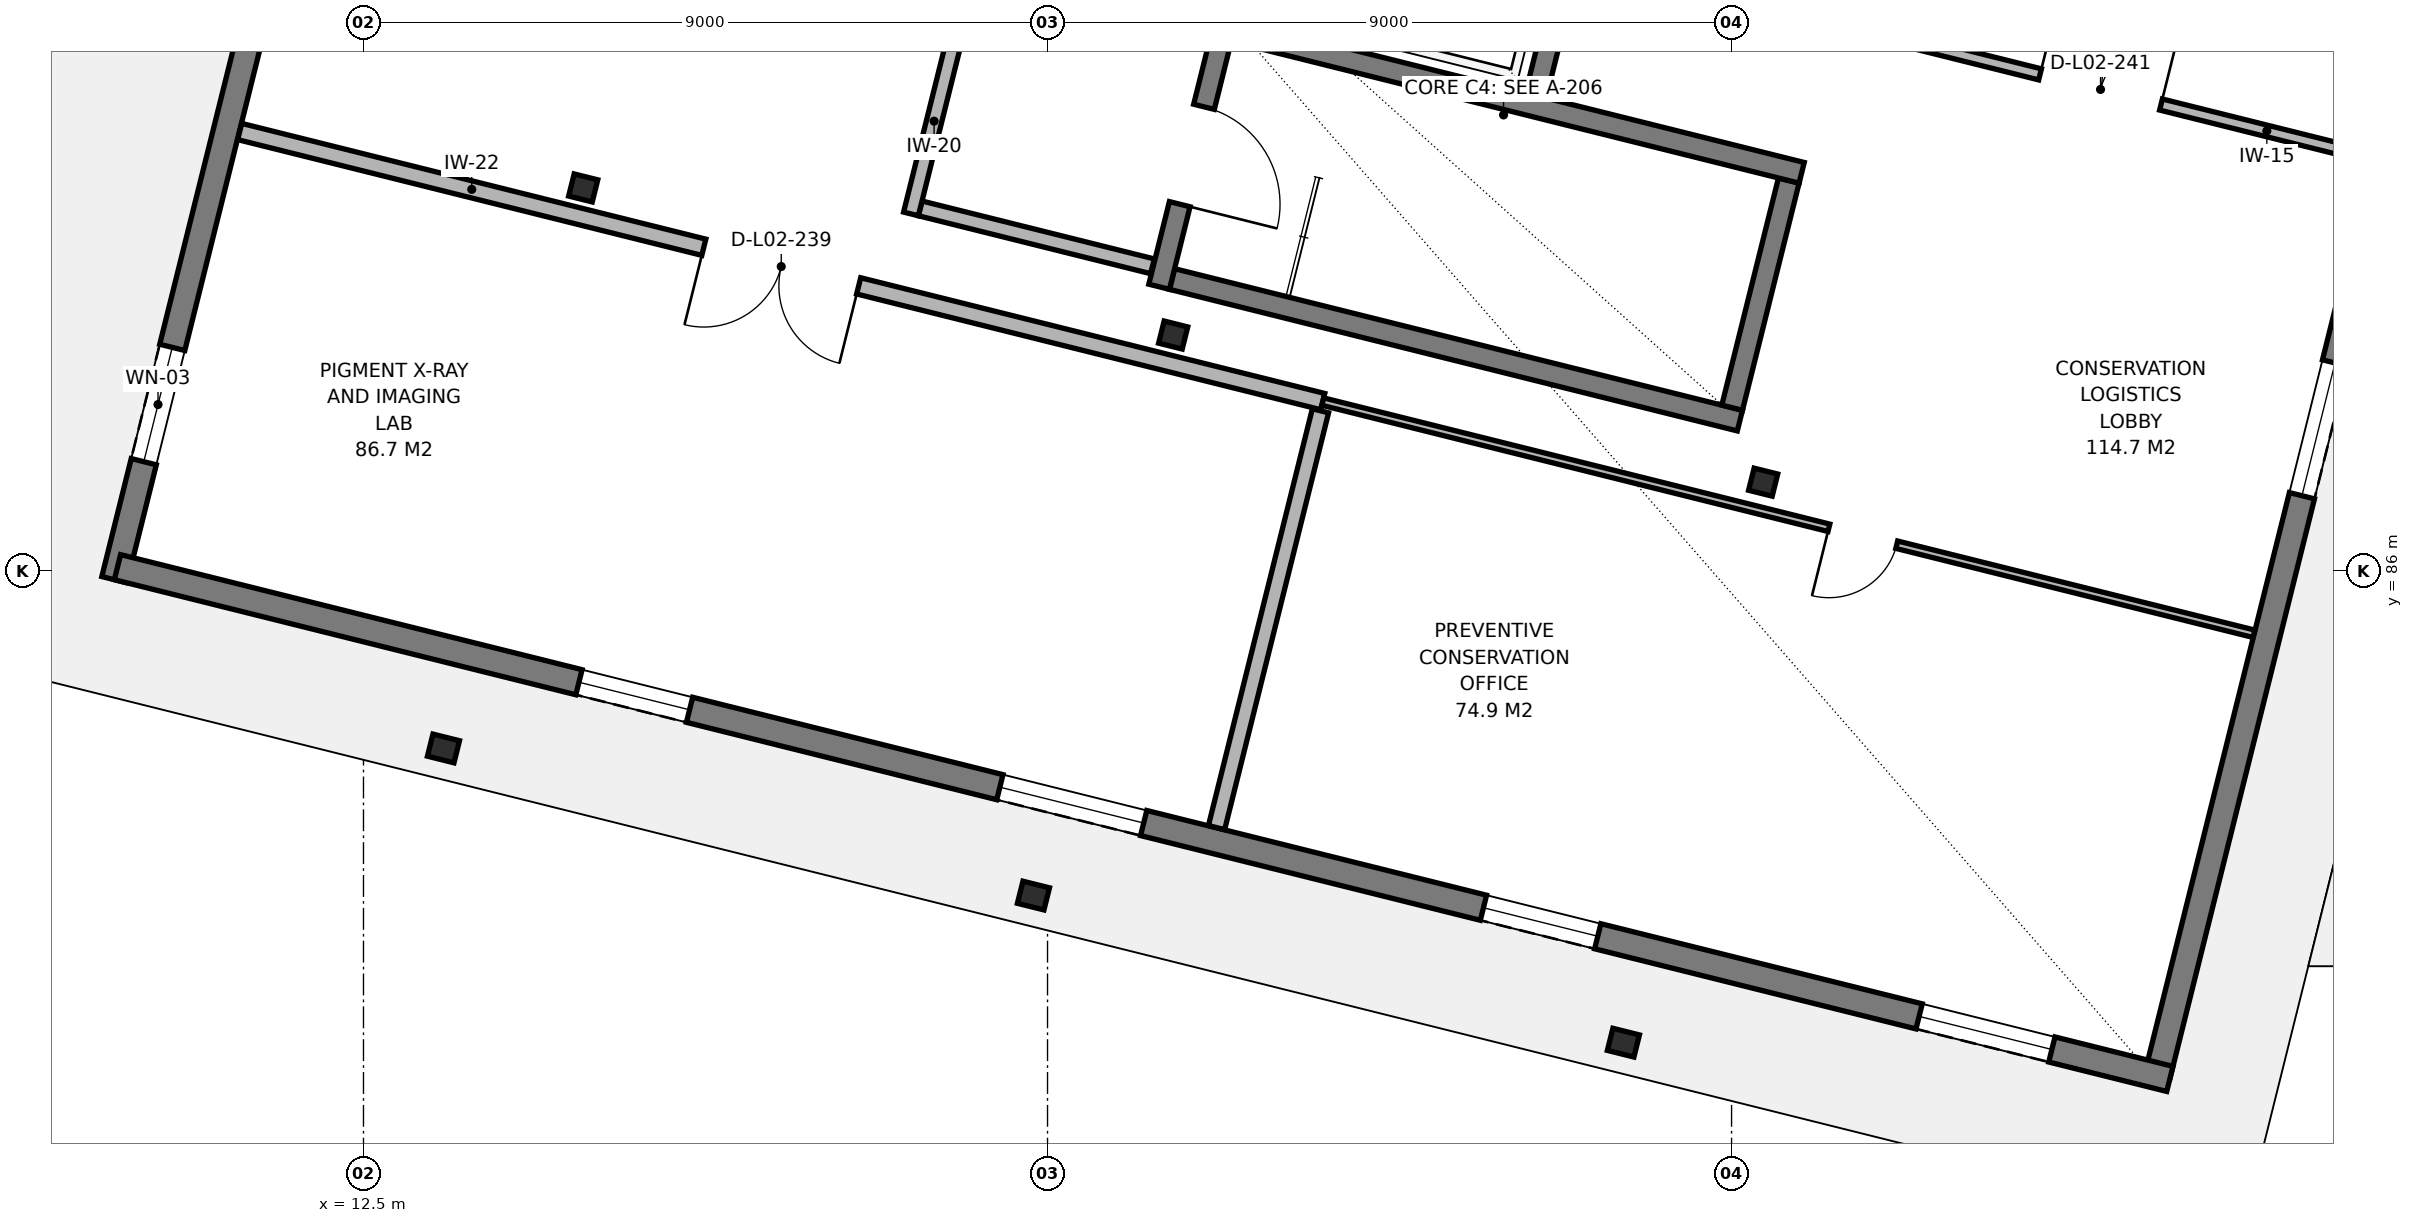
"""IFC4 building model, lengths in metres.
Left out: names, types, materials, properties, quantities, classifications, styles, units other than length and angle.
Written with IfcOpenShell. Run it as: python <this file> out.ifc"""

import sys

from ifc_helpers import new_model, si_unit, direction, frame, frame_2d, origin, origin_2d, place, context, subcontext, project, spatial, rectangle, i_section, extrude, element, fill, save


model = new_model("IFC4")
c1 = context("Model", 3, precision=1e-05, world=origin(), true_north=direction((0.0, 1.0)))
c2 = subcontext(c1, "Body", "Model", "MODEL_VIEW")
j1 = project(units=[si_unit("LENGTHUNIT", "METRE"), si_unit("PLANEANGLEUNIT", "RADIAN")], contexts=[c1])
p1 = place(None, origin())
s1 = spatial("IfcSite", under=j1, at=p1, CompositionType="ELEMENT")
p2 = place(p1, origin())
s2 = spatial("IfcBuilding", under=s1, at=p2, CompositionType="ELEMENT")
p3 = place(p2, frame((0.0, 0.0, 9.52)))
s3 = spatial("IfcBuildingStorey", under=s2, at=p3, CompositionType="ELEMENT", Elevation=9.52)
p4 = place(p3, frame((13.552, 83.665, 0.0), z_axis=(0.0, 0.0, 1.0), x_axis=(0.970295726276, -0.2419218956, 0.0)))
e1 = element("IfcColumn", 1, at=p4, inside=s3, PredefinedType="COLUMN", context=c2, shape_type="SweptSolid", body=[
    extrude(i_section(OverallWidth=0.3, OverallDepth=0.36, WebThickness=0.012, FlangeThickness=0.022, FilletRadius=0.027, at=origin_2d()), origin(), (0.0, 0.0, 1.0), 4.16),
])
p5 = place(p3, frame((15.391, 91.039, 0.0), z_axis=(0.0, 0.0, 1.0), x_axis=(0.970295726276, -0.2419218956, 0.0)))
e2 = element("IfcColumn", 2, at=p5, inside=s3, PredefinedType="COLUMN", context=c2, shape_type="SweptSolid", body=[
    extrude(i_section(OverallWidth=0.3, OverallDepth=0.32, WebThickness=0.011, FlangeThickness=0.021, FilletRadius=0.027, at=origin_2d()), origin(), (0.0, 0.0, 1.0), 4.16),
])
p6 = place(p3, frame((21.315, 81.73, 0.0), z_axis=(0.0, 0.0, 1.0), x_axis=(0.970295726276, -0.2419218956, 0.0)))
e3 = element("IfcColumn", 3, at=p6, inside=s3, PredefinedType="COLUMN", context=c2, shape_type="SweptSolid", body=[
    extrude(i_section(OverallWidth=0.3, OverallDepth=0.36, WebThickness=0.012, FlangeThickness=0.022, FilletRadius=0.027, at=origin_2d()), origin(), (0.0, 0.0, 1.0), 4.16),
])
p7 = place(p3, frame((23.153, 89.104, 0.0), z_axis=(0.0, 0.0, 1.0), x_axis=(0.970295726276, -0.2419218956, 0.0)))
e4 = element("IfcColumn", 4, at=p7, inside=s3, PredefinedType="COLUMN", context=c2, shape_type="SweptSolid", body=[
    extrude(i_section(OverallWidth=0.3, OverallDepth=0.32, WebThickness=0.011, FlangeThickness=0.021, FilletRadius=0.027, at=origin_2d()), origin(), (0.0, 0.0, 1.0), 4.16),
])
p8 = place(p3, frame((29.077, 79.794, 0.0), z_axis=(0.0, 0.0, 1.0), x_axis=(0.970295726276, -0.2419218956, 0.0)))
e5 = element("IfcColumn", 5, at=p8, inside=s3, PredefinedType="COLUMN", context=c2, shape_type="SweptSolid", body=[
    extrude(i_section(OverallWidth=0.3, OverallDepth=0.36, WebThickness=0.012, FlangeThickness=0.022, FilletRadius=0.027, at=origin_2d()), origin(), (0.0, 0.0, 1.0), 4.16),
])
p9 = place(p3, frame((30.916, 87.169, 0.0), z_axis=(0.0, 0.0, 1.0), x_axis=(0.970295726276, -0.2419218956, 0.0)))
e6 = element("IfcColumn", 6, at=p9, inside=s3, PredefinedType="COLUMN", context=c2, shape_type="SweptSolid", body=[
    extrude(i_section(OverallWidth=0.3, OverallDepth=0.32, WebThickness=0.011, FlangeThickness=0.021, FilletRadius=0.027, at=origin_2d()), origin(), (0.0, 0.0, 1.0), 4.16),
])
p10 = place(p3, frame((9.222, 85.885, 0.0), z_axis=(0.0, 0.0, 1.0), x_axis=(0.241917442557, 0.970296836533, 0.0)))
e7 = element("IfcWall", 7, at=p10, inside=s3, PredefinedType="SOLIDWALL", context=c2, shape_type="SweptSolid", body=[
    extrude(rectangle(XDim=19.33, YDim=0.34, at=frame_2d((9.665, 0.0))), origin(), (0.0, 0.0, 1.0), 3.92),
])
p11 = place(p10, frame((1.6, 0.0, 0.85)))
e8 = element("IfcOpeningElement", 8, at=p11, cuts=e7, PredefinedType="OPENING", context=c2, shape_type="SweptSolid", body=[
    extrude(rectangle(XDim=1.55, YDim=1.5, at=frame_2d((0.775, 0.75))), frame((0.0, 0.18, 0.0), z_axis=(0.0, -1.0, 0.0), x_axis=(1.0, 0.0, 0.0)), (0.0, 0.0, 1.0), 0.36),
])
p12 = place(p10, frame((9.665, 0.0, 0.85)))
e9 = element("IfcOpeningElement", 9, at=p12, cuts=e7, PredefinedType="OPENING", context=c2, shape_type="SweptSolid", body=[
    extrude(rectangle(XDim=1.95, YDim=1.5, at=frame_2d((0.975, 0.75))), frame((0.0, 0.18, 0.0), z_axis=(0.0, -1.0, 0.0), x_axis=(1.0, 0.0, 0.0)), (0.0, 0.0, 1.0), 0.36),
])
p13 = place(p3, frame((40.778, 98.115, 0.0), z_axis=(0.0, 0.0, 1.0), x_axis=(-0.241917442557, -0.970296836533, 0.0)))
e10 = element("IfcWall", 10, at=p13, inside=s3, PredefinedType="SOLIDWALL", context=c2, shape_type="SweptSolid", body=[
    extrude(rectangle(XDim=19.33, YDim=0.34, at=frame_2d((9.665, 0.0))), origin(), (0.0, 0.0, 1.0), 3.92),
])
p14 = place(p13, frame((1.6, 0.0, 0.85)))
e11 = element("IfcOpeningElement", 11, at=p14, cuts=e10, PredefinedType="OPENING", context=c2, shape_type="SweptSolid", body=[
    extrude(rectangle(XDim=1.5, YDim=1.7, at=frame_2d((0.75, 0.85))), frame((0.0, 0.18, 0.0), z_axis=(0.0, -1.0, 0.0), x_axis=(1.0, 0.0, 0.0)), (0.0, 0.0, 1.0), 0.36),
])
p15 = place(p13, frame((9.665, 0.0, 0.85)))
e12 = element("IfcOpeningElement", 12, at=p15, cuts=e10, PredefinedType="OPENING", context=c2, shape_type="SweptSolid", body=[
    extrude(rectangle(XDim=1.8, YDim=1.7, at=frame_2d((0.9, 0.85))), frame((0.0, 0.18, 0.0), z_axis=(0.0, -1.0, 0.0), x_axis=(1.0, 0.0, 0.0)), (0.0, 0.0, 1.0), 0.36),
])
p16 = place(p3, frame((36.267, 79.318, 0.0), z_axis=(0.0, 0.0, 1.0), x_axis=(-0.970296082692, 0.24192046609, 0.0)))
e13 = element("IfcWall", 13, at=p16, inside=s3, PredefinedType="SOLIDWALL", context=c2, shape_type="SweptSolid", body=[
    extrude(rectangle(XDim=27.83, YDim=0.34, at=frame_2d((13.915, 0.0))), origin(), (0.0, 0.0, 1.0), 3.92),
])
p17 = place(p16, frame((1.6, 0.0, 0.85)))
e14 = element("IfcOpeningElement", 14, at=p17, cuts=e13, PredefinedType="OPENING", context=c2, shape_type="SweptSolid", body=[
    extrude(rectangle(XDim=1.8, YDim=1.7, at=frame_2d((0.9, 0.85))), frame((0.0, 0.18, 0.0), z_axis=(0.0, -1.0, 0.0), x_axis=(1.0, 0.0, 0.0)), (0.0, 0.0, 1.0), 0.36),
])
p18 = place(p16, frame((7.758, 0.0, 0.85)))
e15 = element("IfcOpeningElement", 15, at=p18, cuts=e13, PredefinedType="OPENING", context=c2, shape_type="SweptSolid", body=[
    extrude(rectangle(XDim=1.55, YDim=1.5, at=frame_2d((0.775, 0.75))), frame((0.0, 0.18, 0.0), z_axis=(0.0, -1.0, 0.0), x_axis=(1.0, 0.0, 0.0)), (0.0, 0.0, 1.0), 0.36),
])
p19 = place(p16, frame((13.915, 0.0, 0.85)))
e16 = element("IfcOpeningElement", 16, at=p19, cuts=e13, PredefinedType="OPENING", context=c2, shape_type="SweptSolid", body=[
    extrude(rectangle(XDim=1.95, YDim=1.5, at=frame_2d((0.975, 0.75))), frame((0.0, 0.18, 0.0), z_axis=(0.0, -1.0, 0.0), x_axis=(1.0, 0.0, 0.0)), (0.0, 0.0, 1.0), 0.36),
])
p20 = place(p16, frame((20.073, 0.0, 0.85)))
e17 = element("IfcOpeningElement", 17, at=p20, cuts=e13, PredefinedType="OPENING", context=c2, shape_type="SweptSolid", body=[
    extrude(rectangle(XDim=1.5, YDim=1.7, at=frame_2d((0.75, 0.85))), frame((0.0, 0.18, 0.0), z_axis=(0.0, -1.0, 0.0), x_axis=(1.0, 0.0, 0.0)), (0.0, 0.0, 1.0), 0.36),
])
p21 = place(p3, frame((23.138, 89.841, 0.0), z_axis=(0.0, 0.0, 1.0), x_axis=(0.970295246537, -0.24192381972, 0.0)))
e18 = element("IfcWall", 18, at=p21, inside=s3, PredefinedType="SHEAR", context=c2, shape_type="SweptSolid", body=[
    extrude(rectangle(XDim=7.7, YDim=0.28, at=frame_2d((3.85, 0.0))), origin(), (0.0, 0.0, 1.0), 3.92),
])
p22 = place(p3, frame((30.508, 88.148, 0.0), z_axis=(0.0, 0.0, 1.0), x_axis=(0.241920098373, 0.970296174373, 0.0)))
e19 = element("IfcWall", 19, at=p22, inside=s3, PredefinedType="SHEAR", context=c2, shape_type="SweptSolid", body=[
    extrude(rectangle(XDim=3.08, YDim=0.28, at=frame_2d((1.54, 0.0))), origin(), (0.0, 0.0, 1.0), 3.92),
])
p23 = place(p3, frame((31.422, 91.239, 0.0), z_axis=(0.0, 0.0, 1.0), x_axis=(-0.970297102167, 0.241916377137, 0.0)))
e20 = element("IfcWall", 20, at=p23, inside=s3, PredefinedType="SHEAR", context=c2, shape_type="SweptSolid", body=[
    extrude(rectangle(XDim=7.7, YDim=0.28, at=frame_2d((3.85, 0.0))), origin(), (0.0, 0.0, 1.0), 3.92),
])
p24 = place(p3, frame((27.924, 92.255, 0.0), z_axis=(0.0, 0.0, 1.0), x_axis=(0.241886356621, 0.970304586447, 0.0)))
e21 = element("IfcWall", 21, at=p24, inside=s3, PredefinedType="SHEAR", context=c2, shape_type="SweptSolid", body=[
    extrude(rectangle(XDim=2.92, YDim=0.28, at=frame_2d((1.46, 0.0))), origin(), (0.0, 0.0, 1.0), 3.92),
])
p25 = place(p3, frame((24.623, 96.376, 0.0), z_axis=(0.0, 0.0, 1.0), x_axis=(-0.241922508616, -0.970295573434, 0.0)))
e22 = element("IfcWall", 22, at=p25, inside=s3, PredefinedType="SHEAR", context=c2, shape_type="SweptSolid", body=[
    extrude(rectangle(XDim=6.84, YDim=0.28, at=frame_2d((3.42, 0.0))), origin(), (0.0, 0.0, 1.0), 3.92),
])
p26 = place(p25, frame((0.75, 0.0, 0.0)))
e23 = element("IfcOpeningElement", 23, at=p26, cuts=e22, PredefinedType="OPENING", context=c2, shape_type="SweptSolid", body=[
    extrude(rectangle(XDim=2.0, YDim=2.3, at=frame_2d((1.0, 1.15))), frame((0.0, 0.15, 0.0), z_axis=(0.0, -1.0, 0.0), x_axis=(1.0, 0.0, 0.0)), (0.0, 0.0, 1.0), 0.3),
])
p27 = place(p25, frame((4.4, 0.0, 0.0)))
e24 = element("IfcOpeningElement", 24, at=p27, cuts=e22, PredefinedType="OPENING", context=c2, shape_type="SweptSolid", body=[
    extrude(rectangle(XDim=1.32, YDim=2.12, at=frame_2d((0.66, 1.06))), frame((0.0, 0.15, 0.0), z_axis=(0.0, -1.0, 0.0), x_axis=(1.0, 0.0, 0.0)), (0.0, 0.0, 1.0), 0.3),
])
p28 = place(p3, frame((19.824, 90.77, 0.0), z_axis=(0.0, 0.0, 1.0), x_axis=(0.970306396763, -0.241879094592, 0.0)))
e25 = element("IfcWall", 25, at=p28, inside=s3, PredefinedType="PARTITIONING", context=c2, shape_type="SweptSolid", body=[
    extrude(rectangle(XDim=3.15, YDim=0.2, at=frame_2d((1.575, 0.0))), origin(), (0.0, 0.0, 1.0), 3.92),
])
p29 = place(p3, frame((19.703, 90.698, 0.0), z_axis=(0.0, 0.0, 1.0), x_axis=(0.24192671796, 0.970294523914, 0.0)))
e26 = element("IfcWall", 26, at=p29, inside=s3, PredefinedType="PARTITIONING", context=c2, shape_type="SweptSolid", body=[
    extrude(rectangle(XDim=6.51, YDim=0.2, at=frame_2d((3.255, 0.0))), origin(), (0.0, 0.0, 1.0), 3.41),
])
p30 = place(p29, frame((2.515, 0.0, 0.0)))
e27 = element("IfcOpeningElement", 27, at=p30, cuts=e26, PredefinedType="OPENING", context=c2, shape_type="SweptSolid", body=[
    extrude(rectangle(XDim=1.48, YDim=2.15, at=frame_2d((0.74, 1.075))), frame((0.0, 0.11, 0.0), z_axis=(0.0, -1.0, 0.0), x_axis=(1.0, 0.0, 0.0)), (0.0, 0.0, 1.0), 0.22),
])
p31 = place(p3, frame((25.121, 88.229, 0.0), z_axis=(0.0, 0.0, 1.0), x_axis=(-0.970293882598, 0.241929290069, 0.0)))
e28 = element("IfcWall", 28, at=p31, inside=s3, PredefinedType="PARTITIONING", context=c2, shape_type="SweptSolid", body=[
    extrude(rectangle(XDim=14.686, YDim=0.22, at=frame_2d((7.343, 0.0))), origin(), (0.0, 0.0, 1.0), 3.46),
])
p32 = place(p31, frame((6.293, 0.0, 0.0)))
e29 = element("IfcOpeningElement", 29, at=p32, cuts=e28, PredefinedType="OPENING", context=c2, shape_type="SweptSolid", body=[
    extrude(rectangle(XDim=2.1, YDim=2.25, at=frame_2d((1.05, 1.125))), frame((0.0, 0.12, 0.0), z_axis=(0.0, -1.0, 0.0), x_axis=(1.0, 0.0, 0.0)), (0.0, 0.0, 1.0), 0.24),
])
p33 = place(p3, frame((37.372, 85.174, 0.0), z_axis=(0.0, 0.0, 1.0), x_axis=(-0.970296993453, 0.241916813174, 0.0)))
e30 = element("IfcWall", 30, at=p33, inside=s3, PredefinedType="PARTITIONING", context=c2, shape_type="SweptSolid", body=[
    extrude(rectangle(XDim=12.626, YDim=0.1, at=frame_2d((6.313, 0.0))), origin(), (0.0, 0.0, 1.0), 3.46),
])
p34 = place(p33, frame((4.843, 0.0, 0.0)))
e31 = element("IfcOpeningElement", 31, at=p34, cuts=e30, PredefinedType="OPENING", context=c2, shape_type="SweptSolid", body=[
    extrude(rectangle(XDim=0.92, YDim=2.08, at=frame_2d((0.46, 1.04))), frame((0.0, 0.06, 0.0), z_axis=(0.0, -1.0, 0.0), x_axis=(1.0, 0.0, 0.0)), (0.0, 0.0, 1.0), 0.12),
])
p35 = place(p3, frame((31.774, 93.228, 0.0), z_axis=(0.0, 0.0, 1.0), x_axis=(0.970297970166, -0.241912895671, 0.0)))
e32 = element("IfcWall", 32, at=p35, inside=s3, PredefinedType="PARTITIONING", context=c2, shape_type="SweptSolid", body=[
    extrude(rectangle(XDim=7.38, YDim=0.15, at=frame_2d((3.69, 0.0))), origin(), (0.0, 0.0, 1.0), 3.46),
])
p36 = place(p35, frame((2.87, 0.0, 0.0)))
e33 = element("IfcOpeningElement", 33, at=p36, cuts=e32, PredefinedType="OPENING", context=c2, shape_type="SweptSolid", body=[
    extrude(rectangle(XDim=1.64, YDim=2.2, at=frame_2d((0.82, 1.1))), frame((0.0, 0.085, 0.0), z_axis=(0.0, -1.0, 0.0), x_axis=(1.0, 0.0, 0.0)), (0.0, 0.0, 1.0), 0.17),
])
p37 = place(p3, frame((25.091, 88.107, 0.0), z_axis=(0.0, 0.0, 1.0), x_axis=(-0.24193582182, -0.970292253973, 0.0)))
e34 = element("IfcWall", 34, at=p37, inside=s3, PredefinedType="PARTITIONING", context=c2, shape_type="SweptSolid", body=[
    extrude(rectangle(XDim=5.651, YDim=0.22, at=frame_2d((2.826, 0.0))), origin(), (0.0, 0.0, 1.0), 3.91),
])
p38 = place(p11, origin())
e35 = element("IfcWindow", 35, at=p38, inside=s3, PartitioningType="SINGLE_PANEL", PredefinedType="WINDOW", context=c2, shape_type="SweptSolid", body=[
    extrude(rectangle(XDim=1.55, YDim=1.5, at=frame_2d((0.775, 0.75))), frame((0.0, 0.03, 0.0), z_axis=(0.0, -1.0, 0.0), x_axis=(1.0, 0.0, 0.0)), (0.0, 0.0, 1.0), 0.06),
])
fill(e8, e35)
p39 = place(p15, origin())
e36 = element("IfcWindow", 36, at=p39, inside=s3, PartitioningType="SINGLE_PANEL", PredefinedType="WINDOW", context=c2, shape_type="SweptSolid", body=[
    extrude(rectangle(XDim=1.8, YDim=1.7, at=frame_2d((0.9, 0.85))), frame((0.0, 0.03, 0.0), z_axis=(0.0, -1.0, 0.0), x_axis=(1.0, 0.0, 0.0)), (0.0, 0.0, 1.0), 0.06),
])
fill(e12, e36)
p40 = place(p17, origin())
e37 = element("IfcWindow", 37, at=p40, inside=s3, PartitioningType="SINGLE_PANEL", PredefinedType="WINDOW", context=c2, shape_type="SweptSolid", body=[
    extrude(rectangle(XDim=1.8, YDim=1.7, at=frame_2d((0.9, 0.85))), frame((0.0, 0.03, 0.0), z_axis=(0.0, -1.0, 0.0), x_axis=(1.0, 0.0, 0.0)), (0.0, 0.0, 1.0), 0.06),
])
fill(e14, e37)
p41 = place(p18, origin())
e38 = element("IfcWindow", 38, at=p41, inside=s3, PartitioningType="SINGLE_PANEL", PredefinedType="WINDOW", context=c2, shape_type="SweptSolid", body=[
    extrude(rectangle(XDim=1.55, YDim=1.5, at=frame_2d((0.775, 0.75))), frame((0.0, 0.03, 0.0), z_axis=(0.0, -1.0, 0.0), x_axis=(1.0, 0.0, 0.0)), (0.0, 0.0, 1.0), 0.06),
])
fill(e15, e38)
p42 = place(p19, origin())
e39 = element("IfcWindow", 39, at=p42, inside=s3, PartitioningType="SINGLE_PANEL", PredefinedType="WINDOW", context=c2, shape_type="SweptSolid", body=[
    extrude(rectangle(XDim=1.95, YDim=1.5, at=frame_2d((0.975, 0.75))), frame((0.0, 0.03, 0.0), z_axis=(0.0, -1.0, 0.0), x_axis=(1.0, 0.0, 0.0)), (0.0, 0.0, 1.0), 0.06),
])
fill(e16, e39)
p43 = place(p20, origin())
e40 = element("IfcWindow", 40, at=p43, inside=s3, PartitioningType="SINGLE_PANEL", PredefinedType="WINDOW", context=c2, shape_type="SweptSolid", body=[
    extrude(rectangle(XDim=1.5, YDim=1.7, at=frame_2d((0.75, 0.85))), frame((0.0, 0.03, 0.0), z_axis=(0.0, -1.0, 0.0), x_axis=(1.0, 0.0, 0.0)), (0.0, 0.0, 1.0), 0.06),
])
fill(e17, e40)
p44 = place(p27, origin())
e41 = element("IfcDoor", 41, at=p44, inside=s3, OperationType="SINGLE_SWING_RIGHT", PredefinedType="DOOR", context=c2, shape_type="SweptSolid", body=[
    extrude(rectangle(XDim=1.32, YDim=2.12, at=frame_2d((0.66, 1.06))), frame((0.0, 0.025, 0.0), z_axis=(0.0, -1.0, 0.0), x_axis=(1.0, 0.0, 0.0)), (0.0, 0.0, 1.0), 0.05),
])
fill(e24, e41)
p45 = place(p32, origin())
e42 = element("IfcDoor", 42, at=p45, inside=s3, OperationType="DOUBLE_DOOR_SINGLE_SWING", PredefinedType="DOOR", context=c2, shape_type="SweptSolid", body=[
    extrude(rectangle(XDim=2.1, YDim=2.25, at=frame_2d((1.05, 1.125))), frame((0.0, 0.025, 0.0), z_axis=(0.0, -1.0, 0.0), x_axis=(1.0, 0.0, 0.0)), (0.0, 0.0, 1.0), 0.05),
])
fill(e29, e42)
p46 = place(p34, origin())
e43 = element("IfcDoor", 43, at=p46, inside=s3, OperationType="SINGLE_SWING_RIGHT", PredefinedType="DOOR", context=c2, shape_type="SweptSolid", body=[
    extrude(rectangle(XDim=0.92, YDim=2.08, at=frame_2d((0.46, 1.04))), frame((0.0, 0.025, 0.0), z_axis=(0.0, -1.0, 0.0), x_axis=(1.0, 0.0, 0.0)), (0.0, 0.0, 1.0), 0.05),
])
fill(e31, e43)
p47 = place(p36, origin())
e44 = element("IfcDoor", 44, at=p47, inside=s3, OperationType="DOUBLE_DOOR_SINGLE_SWING", PredefinedType="DOOR", context=c2, shape_type="SweptSolid", body=[
    extrude(rectangle(XDim=1.64, YDim=2.2, at=frame_2d((0.82, 1.1))), frame((0.0, 0.025, 0.0), z_axis=(0.0, -1.0, 0.0), x_axis=(1.0, 0.0, 0.0)), (0.0, 0.0, 1.0), 0.05),
])
fill(e33, e44)
save(model, sys.argv[1])
